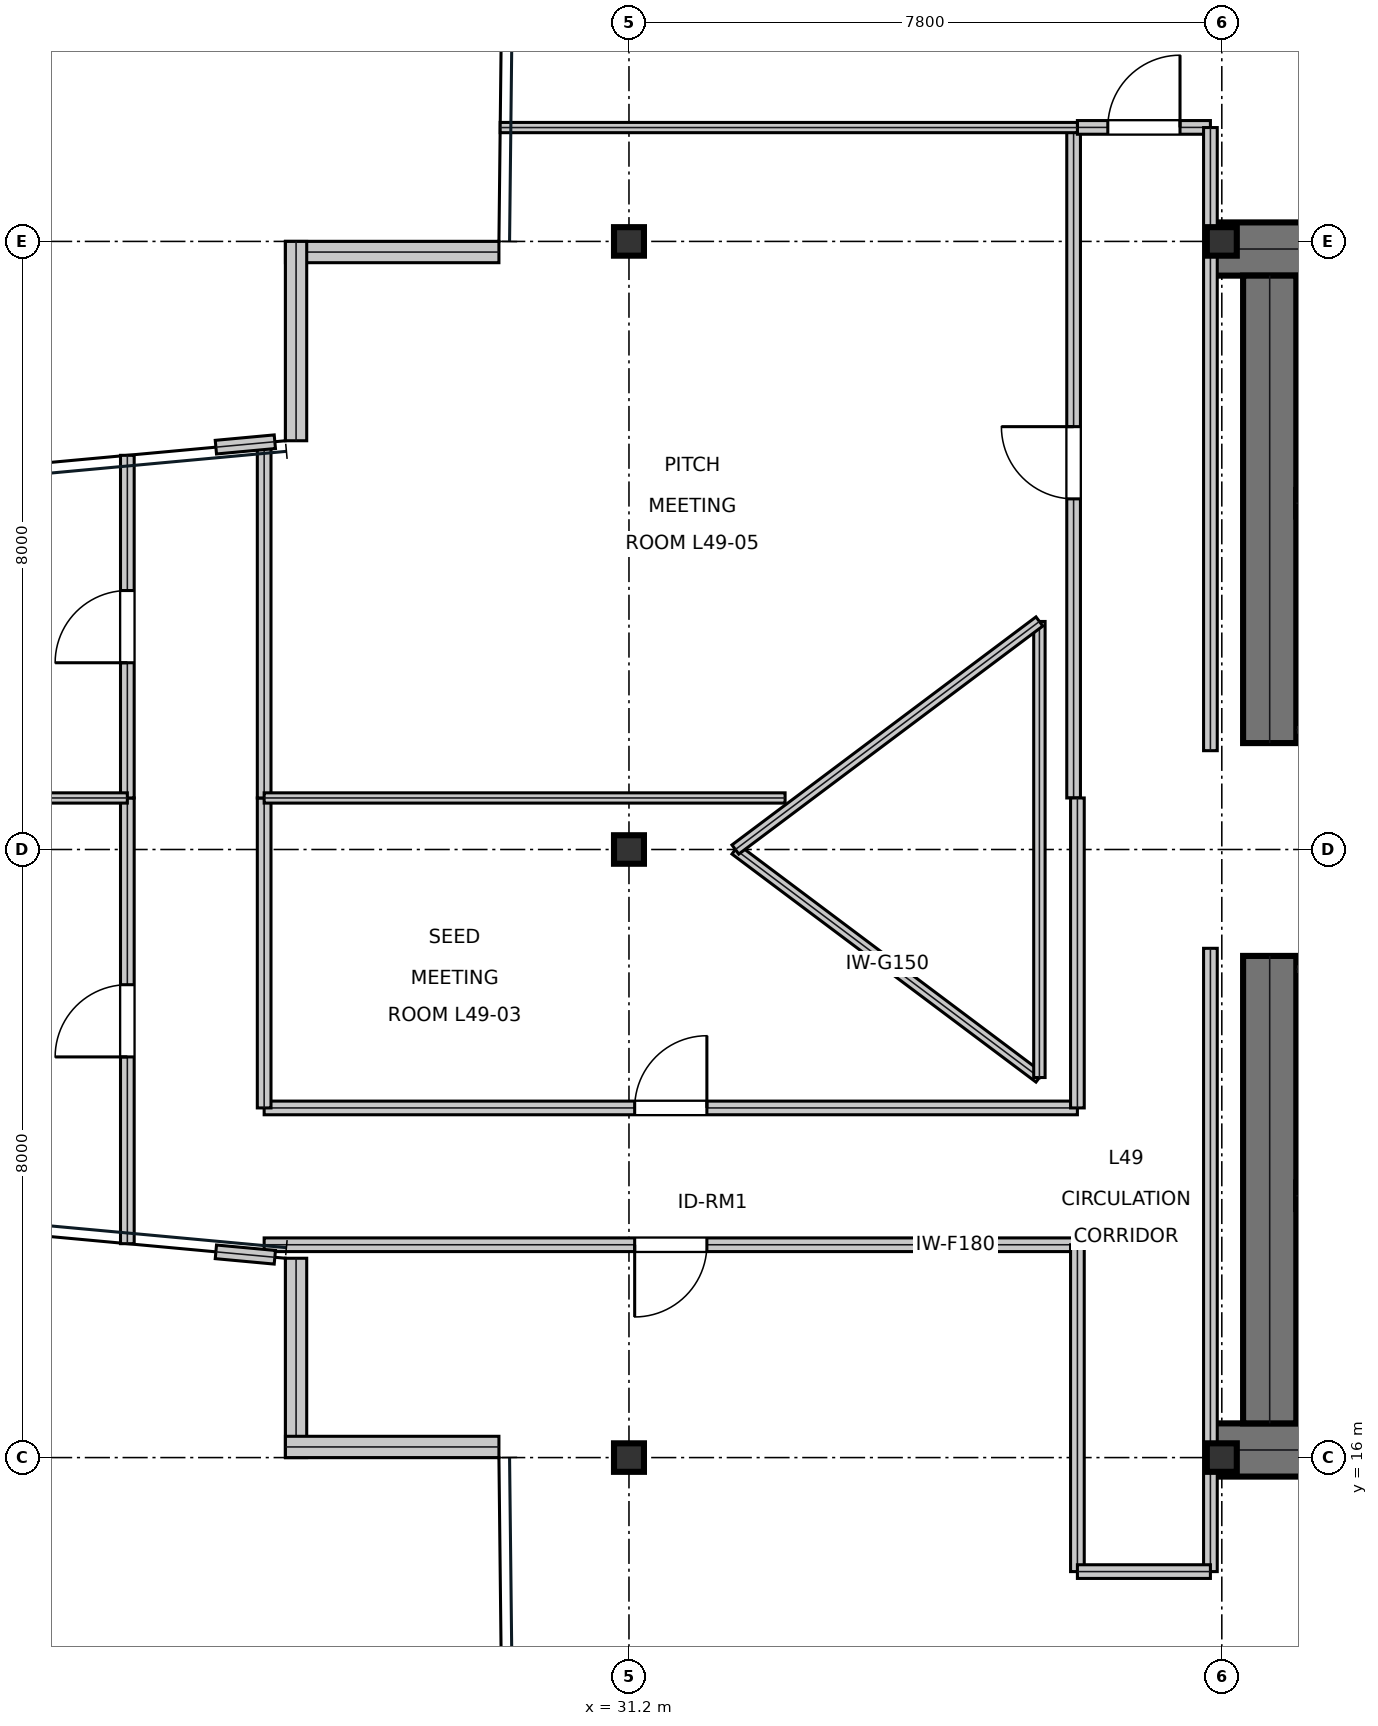
"""IFC4 building model, lengths in metres.
Left out: names, types, materials, properties, quantities, classifications, styles, units other than length and angle.
Written with IfcOpenShell. Run it as: python <this file> out.ifc"""

import sys

from ifc_helpers import new_model, si_unit, direction, frame, frame_2d, origin, origin_2d, place, context, subcontext, project, spatial, rectangle, i_section, extrude, element, fill, save


model = new_model("IFC4")
c1 = context("Model", 3, precision=1e-05, world=origin(), true_north=direction((0.0, 1.0)))
c2 = subcontext(c1, "Body", "Model", "MODEL_VIEW")
j1 = project(units=[si_unit("LENGTHUNIT", "METRE"), si_unit("PLANEANGLEUNIT", "RADIAN")], contexts=[c1])
p1 = place(None, origin())
s1 = spatial("IfcSite", under=j1, at=p1, CompositionType="ELEMENT")
p2 = place(p1, origin())
s2 = spatial("IfcBuilding", under=s1, at=p2, CompositionType="ELEMENT")
p3 = place(p2, frame((0.0, 0.0, 212.1)))
s3 = spatial("IfcBuildingStorey", under=s2, at=p3, CompositionType="ELEMENT", Elevation=212.1)
for number, where, z_axis, x_axis in (
    (1, (38.8, 31.9, 0.0), (0.0, 0.0, 1.0), (1.0, 0.0, 0.0)),
    (2, (38.8, 16.1, 0.0), (0.0, 0.0, 1.0), (1.0, 0.0, 0.0)),
):
    element("IfcWall", number, at=place(p3, frame(where, z_axis=z_axis, x_axis=x_axis)), inside=s3, PredefinedType="SHEAR", context=c2, shape_type="SweptSolid", body=[
        extrude(rectangle(XDim=16.0, YDim=0.7, at=frame_2d((8.0, 0.0))), origin(), (0.0, 0.0, 1.0), 3.79),
    ])
for number, where, z_axis, x_axis in (
    (3, (39.63, 16.45, 0.0), (0.0, 0.0, 1.0), (0.0, 1.0, 0.0)),
    (4, (39.63, 25.4, 0.0), (0.0, 0.0, 1.0), (0.0, 1.0, 0.0)),
):
    element("IfcWall", number, at=place(p3, frame(where, z_axis=z_axis, x_axis=x_axis)), inside=s3, PredefinedType="SHEAR", context=c2, shape_type="SweptSolid", body=[
        extrude(rectangle(XDim=6.15, YDim=0.7, at=frame_2d((3.075, 0.0))), origin(), (0.0, 0.0, 1.0), 3.79),
    ])
p4 = place(p3, frame((39.98, 28.555, 0.0), z_axis=(0.0, 0.0, 1.0), x_axis=(1.0, 0.0, 0.0)))
e5 = element("IfcWall", 5, at=p4, inside=s3, PredefinedType="SHEAR", context=c2, shape_type="SweptSolid", body=[
    extrude(rectangle(XDim=7.71, YDim=0.35, at=frame_2d((3.855, 0.0))), origin(), (0.0, 0.0, 1.0), 3.79),
])
p5 = place(p4, frame((0.25, 0.0, 0.0)))
e6 = element("IfcOpeningElement", 6, at=p5, cuts=e5, PredefinedType="OPENING", context=c2, shape_type="SweptSolid", body=[
    extrude(rectangle(XDim=1.1, YDim=2.15, at=frame_2d((0.55, 1.075))), frame((0.0, 0.185, 0.0), z_axis=(0.0, -1.0, 0.0), x_axis=(1.0, 0.0, 0.0)), (0.0, 0.0, 1.0), 0.37),
])
p6 = place(p3, frame((39.98, 19.445, 0.0), z_axis=(0.0, 0.0, 1.0), x_axis=(1.0, 0.0, 0.0)))
e7 = element("IfcWall", 7, at=p6, inside=s3, PredefinedType="SHEAR", context=c2, shape_type="SweptSolid", body=[
    extrude(rectangle(XDim=7.71, YDim=0.35, at=frame_2d((3.855, 0.0))), origin(), (0.0, 0.0, 1.0), 3.79),
])
p7 = place(p6, frame((0.25, 0.0, 0.0)))
e8 = element("IfcOpeningElement", 8, at=p7, cuts=e7, PredefinedType="OPENING", context=c2, shape_type="SweptSolid", body=[
    extrude(rectangle(XDim=1.1, YDim=2.15, at=frame_2d((0.55, 1.075))), frame((0.0, 0.185, 0.0), z_axis=(0.0, -1.0, 0.0), x_axis=(1.0, 0.0, 0.0)), (0.0, 0.0, 1.0), 0.37),
])
for number, where, z_axis, x_axis in (
    (9, (31.2, 16.0, 0.0), (0.0, 0.0, 1.0), (1.0, 0.0, 0.0)),
    (10, (31.2, 24.0, 0.0), (0.0, 0.0, 1.0), (1.0, 0.0, 0.0)),
    (11, (31.2, 32.0, 0.0), (0.0, 0.0, 1.0), (1.0, 0.0, 0.0)),
    (12, (39.0, 16.0, 0.0), (0.0, 0.0, 1.0), (1.0, 0.0, 0.0)),
    (13, (39.0, 32.0, 0.0), (0.0, 0.0, 1.0), (1.0, 0.0, 0.0)),
):
    element("IfcColumn", number, at=place(p3, frame(where, z_axis=z_axis, x_axis=x_axis)), inside=s3, PredefinedType="COLUMN", context=c2, shape_type="SweptSolid", body=[
        extrude(i_section(OverallWidth=0.394, OverallDepth=0.375, WebThickness=0.017, FlangeThickness=0.028, at=origin_2d()), origin(), (0.0, 0.0, 1.0), 4.044),
    ])
p8 = place(p3, frame((29.489, 31.86, 0.0), z_axis=(0.0, 0.0, 1.0), x_axis=(-1.0, 0.0, 0.0)))
e14 = element("IfcWall", 14, at=p8, inside=s3, PredefinedType="STANDARD", context=c2, shape_type="SweptSolid", body=[
    extrude(rectangle(XDim=2.809, YDim=0.28, at=frame_2d((1.405, 0.0))), origin(), (0.0, 0.0, 1.0), 3.79),
])
for number, where, z_axis, x_axis in (
    (15, (26.82, 32.0, 0.0), (0.0, 0.0, 1.0), (0.0, -1.0, 0.0)),
    (16, (26.82, 18.622, 0.0), (0.0, 0.0, 1.0), (0.0, -1.0, 0.0)),
):
    element("IfcWall", number, at=place(p3, frame(where, z_axis=z_axis, x_axis=x_axis)), inside=s3, PredefinedType="STANDARD", context=c2, shape_type="SweptSolid", body=[
        extrude(rectangle(XDim=2.622, YDim=0.28, at=frame_2d((1.311, 0.0))), origin(), (0.0, 0.0, 1.0), 3.319),
    ])
p9 = place(p3, frame((26.68, 16.14, 0.0), z_axis=(0.0, 0.0, 1.0), x_axis=(1.0, 0.0, 0.0)))
e17 = element("IfcWall", 17, at=p9, inside=s3, PredefinedType="STANDARD", context=c2, shape_type="SweptSolid", body=[
    extrude(rectangle(XDim=2.809, YDim=0.28, at=frame_2d((1.405, 0.0))), origin(), (0.0, 0.0, 1.0), 3.79),
])
p10 = place(p3, frame((39.98, 25.575, 0.0), z_axis=(0.0, 0.0, 1.0), x_axis=(1.0, 0.0, 0.0)))
e18 = element("IfcWall", 18, at=p10, inside=s3, PredefinedType="PARTITIONING", context=c2, shape_type="SweptSolid", body=[
    extrude(rectangle(XDim=5.9, YDim=0.15, at=frame_2d((2.95, 0.0))), origin(), (0.0, 0.0, 1.0), 3.79),
])
p11 = place(p10, frame((2.35, 0.0, 0.0)))
e19 = element("IfcOpeningElement", 19, at=p11, cuts=e18, PredefinedType="OPENING", context=c2, shape_type="SweptSolid", body=[
    extrude(rectangle(XDim=1.05, YDim=2.15, at=frame_2d((0.525, 1.075))), frame((0.0, 0.085, 0.0), z_axis=(0.0, -1.0, 0.0), x_axis=(1.0, 0.0, 0.0)), (0.0, 0.0, 1.0), 0.17),
])
p12 = place(p3, frame((39.98, 22.425, 0.0), z_axis=(0.0, 0.0, 1.0), x_axis=(1.0, 0.0, 0.0)))
e20 = element("IfcWall", 20, at=p12, inside=s3, PredefinedType="PARTITIONING", context=c2, shape_type="SweptSolid", body=[
    extrude(rectangle(XDim=5.9, YDim=0.15, at=frame_2d((2.95, 0.0))), origin(), (0.0, 0.0, 1.0), 3.79),
])
p13 = place(p12, frame((2.35, 0.0, 0.0)))
e21 = element("IfcOpeningElement", 21, at=p13, cuts=e20, PredefinedType="OPENING", context=c2, shape_type="SweptSolid", body=[
    extrude(rectangle(XDim=1.05, YDim=2.15, at=frame_2d((0.525, 1.075))), frame((0.0, 0.085, 0.0), z_axis=(0.0, -1.0, 0.0), x_axis=(1.0, 0.0, 0.0)), (0.0, 0.0, 1.0), 0.17),
])
p14 = place(p3, frame((26.4, 18.8, 0.0), z_axis=(0.0, 0.0, 1.0), x_axis=(1.0, 0.0, 0.0)))
e22 = element("IfcWall", 22, at=p14, inside=s3, PredefinedType="SOLIDWALL", context=c2, shape_type="SweptSolid", body=[
    extrude(rectangle(XDim=10.7, YDim=0.18, at=frame_2d((5.35, 0.0))), origin(), (0.0, 0.0, 1.0), 3.241),
])
p15 = place(p14, frame((4.875, 0.0, 0.0)))
e23 = element("IfcOpeningElement", 23, at=p15, cuts=e22, PredefinedType="OPENING", context=c2, shape_type="SweptSolid", body=[
    extrude(rectangle(XDim=0.95, YDim=2.15, at=frame_2d((0.475, 1.075))), frame((0.0, 0.1, 0.0), z_axis=(0.0, -1.0, 0.0), x_axis=(1.0, 0.0, 0.0)), (0.0, 0.0, 1.0), 0.2),
])
p16 = place(p3, frame((24.6, 18.814, 0.0), z_axis=(0.0, 0.0, 1.0), x_axis=(0.0, 1.0, 0.0)))
e24 = element("IfcWall", 24, at=p16, inside=s3, PredefinedType="SOLIDWALL", context=c2, shape_type="SweptSolid", body=[
    extrude(rectangle(XDim=5.864, YDim=0.18, at=frame_2d((2.932, 0.0))), origin(), (0.0, 0.0, 1.0), 3.241),
])
p17 = place(p16, frame((2.457, 0.0, 0.0)))
e25 = element("IfcOpeningElement", 25, at=p17, cuts=e24, PredefinedType="OPENING", context=c2, shape_type="SweptSolid", body=[
    extrude(rectangle(XDim=0.95, YDim=2.15, at=frame_2d((0.475, 1.075))), frame((0.0, 0.1, 0.0), z_axis=(0.0, -1.0, 0.0), x_axis=(1.0, 0.0, 0.0)), (0.0, 0.0, 1.0), 0.2),
])
p18 = place(p3, frame((26.4, 20.6, 0.0), z_axis=(0.0, 0.0, 1.0), x_axis=(1.0, 0.0, 0.0)))
e26 = element("IfcWall", 26, at=p18, inside=s3, PredefinedType="SOLIDWALL", context=c2, shape_type="SweptSolid", body=[
    extrude(rectangle(XDim=10.7, YDim=0.18, at=frame_2d((5.35, 0.0))), origin(), (0.0, 0.0, 1.0), 3.241),
])
p19 = place(p18, frame((4.875, 0.0, 0.0)))
e27 = element("IfcOpeningElement", 27, at=p19, cuts=e26, PredefinedType="OPENING", context=c2, shape_type="SweptSolid", body=[
    extrude(rectangle(XDim=0.95, YDim=2.15, at=frame_2d((0.475, 1.075))), frame((0.0, 0.1, 0.0), z_axis=(0.0, -1.0, 0.0), x_axis=(1.0, 0.0, 0.0)), (0.0, 0.0, 1.0), 0.2),
])
p20 = place(p3, frame((24.6, 24.678, 0.0), z_axis=(0.0, 0.0, 1.0), x_axis=(0.0, 1.0, 0.0)))
e28 = element("IfcWall", 28, at=p20, inside=s3, PredefinedType="SOLIDWALL", context=c2, shape_type="SweptSolid", body=[
    extrude(rectangle(XDim=4.508, YDim=0.18, at=frame_2d((2.254, 0.0))), origin(), (0.0, 0.0, 1.0), 3.241),
])
p21 = place(p20, frame((1.779, 0.0, 0.0)))
e29 = element("IfcOpeningElement", 29, at=p21, cuts=e28, PredefinedType="OPENING", context=c2, shape_type="SweptSolid", body=[
    extrude(rectangle(XDim=0.95, YDim=2.15, at=frame_2d((0.475, 1.075))), frame((0.0, 0.1, 0.0), z_axis=(0.0, -1.0, 0.0), x_axis=(1.0, 0.0, 0.0)), (0.0, 0.0, 1.0), 0.2),
])
p22 = place(p3, frame((37.05, 24.678, 0.0), z_axis=(0.0, 0.0, 1.0), x_axis=(0.0, 1.0, 0.0)))
e30 = element("IfcWall", 30, at=p22, inside=s3, PredefinedType="SOLIDWALL", context=c2, shape_type="SweptSolid", body=[
    extrude(rectangle(XDim=8.82, YDim=0.18, at=frame_2d((4.41, 0.0))), origin(), (0.0, 0.0, 1.0), 3.241),
])
p23 = place(p22, frame((3.935, 0.0, 0.0)))
e31 = element("IfcOpeningElement", 31, at=p23, cuts=e30, PredefinedType="OPENING", context=c2, shape_type="SweptSolid", body=[
    extrude(rectangle(XDim=0.95, YDim=2.15, at=frame_2d((0.475, 1.075))), frame((0.0, 0.1, 0.0), z_axis=(0.0, -1.0, 0.0), x_axis=(1.0, 0.0, 0.0)), (0.0, 0.0, 1.0), 0.2),
])
p24 = place(p3, frame((37.1, 33.5, 0.0), z_axis=(0.0, 0.0, 1.0), x_axis=(1.0, 0.0, 0.0)))
e32 = element("IfcWall", 32, at=p24, inside=s3, PredefinedType="SOLIDWALL", context=c2, shape_type="SweptSolid", body=[
    extrude(rectangle(XDim=1.75, YDim=0.18, at=frame_2d((0.875, 0.0))), origin(), (0.0, 0.0, 1.0), 3.241),
])
p25 = place(p24, frame((0.4, 0.0, 0.0)))
e33 = element("IfcOpeningElement", 33, at=p25, cuts=e32, PredefinedType="OPENING", context=c2, shape_type="SweptSolid", body=[
    extrude(rectangle(XDim=0.95, YDim=2.15, at=frame_2d((0.475, 1.075))), frame((0.0, 0.1, 0.0), z_axis=(0.0, -1.0, 0.0), x_axis=(1.0, 0.0, 0.0)), (0.0, 0.0, 1.0), 0.2),
])
p26 = place(p3, frame((38.85, 14.5, 0.0), z_axis=(0.0, 0.0, 1.0), x_axis=(0.0, 1.0, 0.0)))
e34 = element("IfcWall", 34, at=p26, inside=s3, PredefinedType="SOLIDWALL", context=c2, shape_type="SweptSolid", body=[
    extrude(rectangle(XDim=8.2, YDim=0.18, at=frame_2d((4.1, 0.0))), origin(), (0.0, 0.0, 1.0), 3.241),
])
p27 = place(p3, frame((37.1, 14.5, 0.0), z_axis=(0.0, 0.0, 1.0), x_axis=(0.0, 1.0, 0.0)))
e35 = element("IfcWall", 35, at=p27, inside=s3, PredefinedType="SOLIDWALL", context=c2, shape_type="SweptSolid", body=[
    extrude(rectangle(XDim=4.3, YDim=0.18, at=frame_2d((2.15, 0.0))), origin(), (0.0, 0.0, 1.0), 3.241),
])
p28 = place(p3, frame((37.1, 14.5, 0.0), z_axis=(0.0, 0.0, 1.0), x_axis=(1.0, 0.0, 0.0)))
e36 = element("IfcWall", 36, at=p28, inside=s3, PredefinedType="SOLIDWALL", context=c2, shape_type="SweptSolid", body=[
    extrude(rectangle(XDim=1.75, YDim=0.18, at=frame_2d((0.875, 0.0))), origin(), (0.0, 0.0, 1.0), 3.241),
])
p29 = place(p3, frame((25.765, 18.707, 0.0), z_axis=(0.0, 0.0, 1.0), x_axis=(0.995774178655, -0.091835641909, 0.0)))
e37 = element("IfcWall", 37, at=p29, inside=s3, PredefinedType="SOLIDWALL", context=c2, shape_type="SweptSolid", body=[
    extrude(rectangle(XDim=0.779, YDim=0.18, at=frame_2d((0.389, 0.0))), origin(), (0.0, 0.0, 1.0), 3.79),
])
p30 = place(p3, frame((26.4, 20.6, 0.0), z_axis=(0.0, 0.0, 1.0), x_axis=(0.0, 1.0, 0.0)))
e38 = element("IfcWall", 38, at=p30, inside=s3, PredefinedType="SOLIDWALL", context=c2, shape_type="SweptSolid", body=[
    extrude(rectangle(XDim=4.078, YDim=0.18, at=frame_2d((2.039, 0.0))), origin(), (0.0, 0.0, 1.0), 3.241),
])
p31 = place(p3, frame((37.1, 20.6, 0.0), z_axis=(0.0, 0.0, 1.0), x_axis=(0.0, 1.0, 0.0)))
e39 = element("IfcWall", 39, at=p31, inside=s3, PredefinedType="SOLIDWALL", context=c2, shape_type="SweptSolid", body=[
    extrude(rectangle(XDim=4.078, YDim=0.18, at=frame_2d((2.039, 0.0))), origin(), (0.0, 0.0, 1.0), 3.79),
])
p32 = place(p3, frame((26.4, 24.678, 0.0), z_axis=(0.0, 0.0, 1.0), x_axis=(0.0, 1.0, 0.0)))
e40 = element("IfcWall", 40, at=p32, inside=s3, PredefinedType="SOLIDWALL", context=c2, shape_type="SweptSolid", body=[
    extrude(rectangle(XDim=4.674, YDim=0.18, at=frame_2d((2.337, 0.0))), origin(), (0.0, 0.0, 1.0), 3.241),
])
p33 = place(p3, frame((25.765, 29.293, 0.0), z_axis=(0.0, 0.0, 1.0), x_axis=(0.995774178655, 0.091835641909, 0.0)))
e41 = element("IfcWall", 41, at=p33, inside=s3, PredefinedType="SOLIDWALL", context=c2, shape_type="SweptSolid", body=[
    extrude(rectangle(XDim=0.779, YDim=0.18, at=frame_2d((0.389, 0.0))), origin(), (0.0, 0.0, 1.0), 3.79),
])
p34 = place(p3, frame((38.85, 25.3, 0.0), z_axis=(0.0, 0.0, 1.0), x_axis=(0.0, 1.0, 0.0)))
e42 = element("IfcWall", 42, at=p34, inside=s3, PredefinedType="SOLIDWALL", context=c2, shape_type="SweptSolid", body=[
    extrude(rectangle(XDim=8.198, YDim=0.18, at=frame_2d((4.099, 0.0))), origin(), (0.0, 0.0, 1.0), 3.241),
])
p35 = place(p3, frame((12.991, 24.678, 0.0), z_axis=(0.0, 0.0, 1.0), x_axis=(1.0, 0.0, 0.0)))
e43 = element("IfcWall", 43, at=p35, inside=s3, PredefinedType="PARTITIONING", context=c2, shape_type="SweptSolid", body=[
    extrude(rectangle(XDim=11.609, YDim=0.135, at=frame_2d((5.805, 0.0))), origin(), (0.0, 0.0, 1.0), 3.319),
])
p36 = place(p3, frame((26.4, 24.678, 0.0), z_axis=(0.0, 0.0, 1.0), x_axis=(1.0, 0.0, 0.0)))
e44 = element("IfcWall", 44, at=p36, inside=s3, PredefinedType="PARTITIONING", context=c2, shape_type="SweptSolid", body=[
    extrude(rectangle(XDim=6.854, YDim=0.135, at=frame_2d((3.427, 0.0))), origin(), (0.0, 0.0, 1.0), 3.241),
])
p37 = place(p3, frame((29.506, 33.498, 0.0), z_axis=(0.0, 0.0, 1.0), x_axis=(1.0, 0.0, 0.0)))
e45 = element("IfcWall", 45, at=p37, inside=s3, PredefinedType="PARTITIONING", context=c2, shape_type="SweptSolid", body=[
    extrude(rectangle(XDim=7.594, YDim=0.135, at=frame_2d((3.797, 0.0))), origin(), (0.0, 0.0, 1.0), 3.319),
])
p38 = place(p3, frame((32.6, 24.0, 0.0), z_axis=(0.0, 0.0, 1.0), x_axis=(0.8, -0.6, 0.0)))
e46 = element("IfcWall", 46, at=p38, inside=s3, PredefinedType="MOVABLE", context=c2, shape_type="SweptSolid", body=[
    extrude(rectangle(XDim=5.0, YDim=0.15, at=frame_2d((2.5, 0.0))), origin(), (0.0, 0.0, 1.0), 3.79),
])
p39 = place(p3, frame((36.6, 21.0, 0.0), z_axis=(0.0, 0.0, 1.0), x_axis=(0.0, 1.0, 0.0)))
e47 = element("IfcWall", 47, at=p39, inside=s3, PredefinedType="MOVABLE", context=c2, shape_type="SweptSolid", body=[
    extrude(rectangle(XDim=6.0, YDim=0.15, at=frame_2d((3.0, 0.0))), origin(), (0.0, 0.0, 1.0), 3.79),
])
p40 = place(p3, frame((36.6, 27.0, 0.0), z_axis=(0.0, 0.0, 1.0), x_axis=(-0.8, -0.6, 0.0)))
e48 = element("IfcWall", 48, at=p40, inside=s3, PredefinedType="MOVABLE", context=c2, shape_type="SweptSolid", body=[
    extrude(rectangle(XDim=5.0, YDim=0.15, at=frame_2d((2.5, 0.0))), origin(), (0.0, 0.0, 1.0), 3.79),
])
p41 = place(p15, frame((0.95, 0.0, 0.0), z_axis=(0.0, 0.0, 1.0), x_axis=(-1.0, 0.0, 0.0)))
e49 = element("IfcDoor", 49, at=p41, inside=s3, OperationType="SINGLE_SWING_RIGHT", PredefinedType="DOOR", context=c2, shape_type="SweptSolid", body=[
    extrude(rectangle(XDim=0.95, YDim=2.15, at=frame_2d((0.475, 1.075))), frame((0.0, 0.025, 0.0), z_axis=(0.0, -1.0, 0.0), x_axis=(1.0, 0.0, 0.0)), (0.0, 0.0, 1.0), 0.05),
])
fill(e23, e49)
p42 = place(p17, origin())
e50 = element("IfcDoor", 50, at=p42, inside=s3, OperationType="SINGLE_SWING_LEFT", PredefinedType="DOOR", context=c2, shape_type="SweptSolid", body=[
    extrude(rectangle(XDim=0.95, YDim=2.15, at=frame_2d((0.475, 1.075))), frame((0.0, 0.025, 0.0), z_axis=(0.0, -1.0, 0.0), x_axis=(1.0, 0.0, 0.0)), (0.0, 0.0, 1.0), 0.05),
])
fill(e25, e50)
p43 = place(p19, origin())
e51 = element("IfcDoor", 51, at=p43, inside=s3, OperationType="SINGLE_SWING_RIGHT", PredefinedType="DOOR", context=c2, shape_type="SweptSolid", body=[
    extrude(rectangle(XDim=0.95, YDim=2.15, at=frame_2d((0.475, 1.075))), frame((0.0, 0.025, 0.0), z_axis=(0.0, -1.0, 0.0), x_axis=(1.0, 0.0, 0.0)), (0.0, 0.0, 1.0), 0.05),
])
fill(e27, e51)
p44 = place(p21, origin())
e52 = element("IfcDoor", 52, at=p44, inside=s3, OperationType="SINGLE_SWING_LEFT", PredefinedType="DOOR", context=c2, shape_type="SweptSolid", body=[
    extrude(rectangle(XDim=0.95, YDim=2.15, at=frame_2d((0.475, 1.075))), frame((0.0, 0.025, 0.0), z_axis=(0.0, -1.0, 0.0), x_axis=(1.0, 0.0, 0.0)), (0.0, 0.0, 1.0), 0.05),
])
fill(e29, e52)
p45 = place(p23, origin())
e53 = element("IfcDoor", 53, at=p45, inside=s3, OperationType="SINGLE_SWING_RIGHT", PredefinedType="DOOR", context=c2, shape_type="SweptSolid", body=[
    extrude(rectangle(XDim=0.95, YDim=2.15, at=frame_2d((0.475, 1.075))), frame((0.0, 0.025, 0.0), z_axis=(0.0, -1.0, 0.0), x_axis=(1.0, 0.0, 0.0)), (0.0, 0.0, 1.0), 0.05),
])
fill(e31, e53)
p46 = place(p25, origin())
e54 = element("IfcDoor", 54, at=p46, inside=s3, OperationType="SINGLE_SWING_RIGHT", PredefinedType="DOOR", context=c2, shape_type="SweptSolid", body=[
    extrude(rectangle(XDim=0.95, YDim=2.15, at=frame_2d((0.475, 1.075))), frame((0.0, 0.025, 0.0), z_axis=(0.0, -1.0, 0.0), x_axis=(1.0, 0.0, 0.0)), (0.0, 0.0, 1.0), 0.05),
])
fill(e33, e54)
save(model, sys.argv[1])
